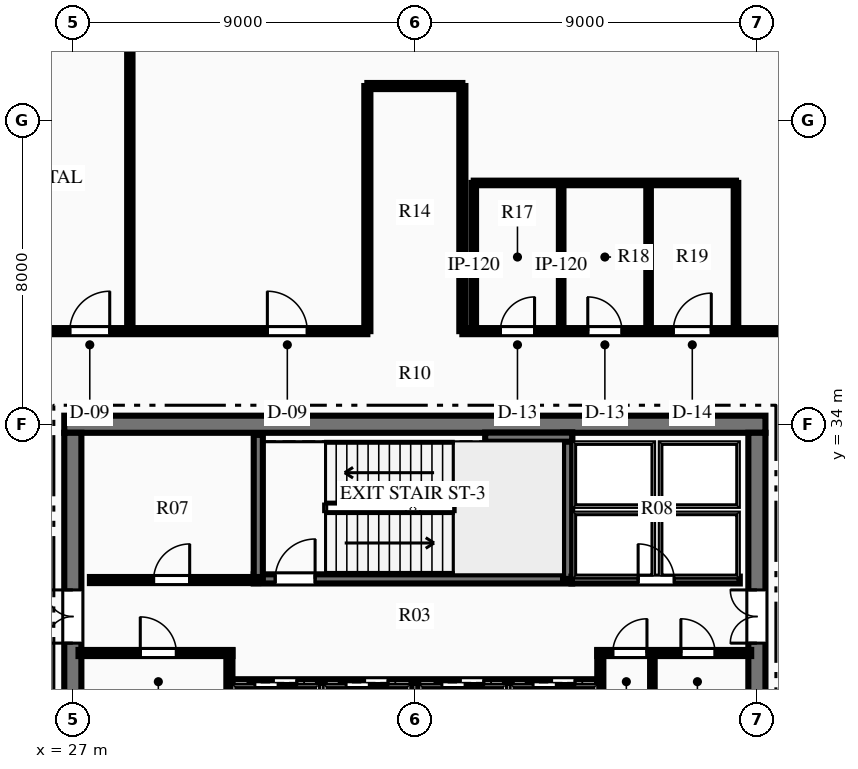
"""IFC4 building model, lengths in metres.
Left out: names, types, materials, properties, quantities, classifications, styles, units other than length and angle.
Written with IfcOpenShell. Run it as: python <this file> out.ifc"""

import sys

from ifc_helpers import new_model, si_unit, direction, frame, frame_2d, origin, place, context, subcontext, project, spatial, rectangle, extrude, element, fill, save


model = new_model("IFC4")
c1 = context("Model", 3, precision=1e-05, world=origin(), true_north=direction((0.0, 1.0)))
c2 = subcontext(c1, "Body", "Model", "MODEL_VIEW")
j1 = project(units=[si_unit("LENGTHUNIT", "METRE"), si_unit("PLANEANGLEUNIT", "RADIAN")], contexts=[c1])
p1 = place(None, origin())
s1 = spatial("IfcSite", under=j1, at=p1, CompositionType="ELEMENT")
p2 = place(p1, origin())
s2 = spatial("IfcBuilding", under=s1, at=p2, CompositionType="ELEMENT")
p3 = place(p2, frame((0.0, 0.0, 244.2)))
s3 = spatial("IfcBuildingStorey", under=s2, at=p3, CompositionType="ELEMENT", Elevation=244.2)
p4 = place(p3, frame((26.775, 34.0, 0.0), z_axis=(0.0, 0.0, 1.0), x_axis=(1.0, 0.0, 0.0)))
e1 = element("IfcWall", 1, at=p4, inside=s3, PredefinedType="SHEAR", context=c2, shape_type="SweptSolid", body=[
    extrude(rectangle(XDim=18.45, YDim=0.45, at=frame_2d((9.225, 0.0))), origin(), (0.0, 0.0, 1.0), 4.5),
])
p5 = place(p3, frame((27.0, 18.225, 0.0), z_axis=(0.0, 0.0, 1.0), x_axis=(0.0, 1.0, 0.0)))
e2 = element("IfcWall", 2, at=p5, inside=s3, PredefinedType="SHEAR", context=c2, shape_type="SweptSolid", body=[
    extrude(rectangle(XDim=15.55, YDim=0.45, at=frame_2d((7.775, 0.0))), origin(), (0.0, 0.0, 1.0), 4.5),
])
p6 = place(p5, frame((10.015, 0.0, 0.0)))
e3 = element("IfcOpeningElement", 3, at=p6, cuts=e2, PredefinedType="OPENING", context=c2, shape_type="SweptSolid", body=[
    extrude(rectangle(XDim=1.4, YDim=2.2, at=frame_2d((0.7, 1.1))), frame((0.0, 0.235, 0.0), z_axis=(0.0, -1.0, 0.0), x_axis=(1.0, 0.0, 0.0)), (0.0, 0.0, 1.0), 0.47),
])
p7 = place(p3, frame((45.0, 18.225, 0.0), z_axis=(0.0, 0.0, 1.0), x_axis=(0.0, 1.0, 0.0)))
e4 = element("IfcWall", 4, at=p7, inside=s3, PredefinedType="SHEAR", context=c2, shape_type="SweptSolid", body=[
    extrude(rectangle(XDim=15.55, YDim=0.45, at=frame_2d((7.775, 0.0))), origin(), (0.0, 0.0, 1.0), 4.5),
])
p8 = place(p7, frame((10.015, 0.0, 0.0)))
e5 = element("IfcOpeningElement", 5, at=p8, cuts=e4, PredefinedType="OPENING", context=c2, shape_type="SweptSolid", body=[
    extrude(rectangle(XDim=1.4, YDim=2.2, at=frame_2d((0.7, 1.1))), frame((0.0, 0.235, 0.0), z_axis=(0.0, -1.0, 0.0), x_axis=(1.0, 0.0, 0.0)), (0.0, 0.0, 1.0), 0.47),
])
p9 = place(p3, frame((31.76, 29.93, 0.0), z_axis=(0.0, 0.0, 1.0), x_axis=(1.0, 0.0, 0.0)))
e6 = element("IfcWall", 6, at=p9, inside=s3, PredefinedType="SHEAR", context=c2, shape_type="SweptSolid", body=[
    extrude(rectangle(XDim=8.38, YDim=0.24, at=frame_2d((4.19, 0.0))), origin(), (0.0, 0.0, 1.0), 4.5),
])
p10 = place(p9, frame((0.565, 0.0, 0.0)))
e7 = element("IfcOpeningElement", 7, at=p10, cuts=e6, PredefinedType="OPENING", context=c2, shape_type="SweptSolid", body=[
    extrude(rectangle(XDim=1.05, YDim=2.15, at=frame_2d((0.525, 1.075))), frame((0.0, 0.13, 0.0), z_axis=(0.0, -1.0, 0.0), x_axis=(1.0, 0.0, 0.0)), (0.0, 0.0, 1.0), 0.26),
])
p11 = place(p3, frame((31.88, 29.93, 0.0), z_axis=(0.0, 0.0, 1.0), x_axis=(0.0, 1.0, 0.0)))
e8 = element("IfcWall", 8, at=p11, inside=s3, PredefinedType="SHEAR", context=c2, shape_type="SweptSolid", body=[
    extrude(rectangle(XDim=3.79, YDim=0.24, at=frame_2d((1.895, 0.0))), origin(), (0.0, 0.0, 1.0), 4.5),
])
p12 = place(p3, frame((40.02, 29.93, 0.0), z_axis=(0.0, 0.0, 1.0), x_axis=(0.0, 1.0, 0.0)))
e9 = element("IfcWall", 9, at=p12, inside=s3, PredefinedType="SHEAR", context=c2, shape_type="SweptSolid", body=[
    extrude(rectangle(XDim=3.85, YDim=0.24, at=frame_2d((1.925, 0.0))), origin(), (0.0, 0.0, 1.0), 4.5),
])
p13 = place(p3, frame((37.85, 33.66, 0.0), z_axis=(0.0, 0.0, 1.0), x_axis=(1.0, 0.0, 0.0)))
e10 = element("IfcWall", 10, at=p13, inside=s3, PredefinedType="SHEAR", context=c2, shape_type="SweptSolid", body=[
    extrude(rectangle(XDim=2.29, YDim=0.24, at=frame_2d((1.145, 0.0))), origin(), (0.0, 0.0, 1.0), 4.5),
])
p14 = place(p3, frame((27.15, 27.98, 0.0), z_axis=(0.0, 0.0, 1.0), x_axis=(1.0, 0.0, 0.0)))
e11 = element("IfcWall", 11, at=p14, inside=s3, PredefinedType="PARTITIONING", context=c2, shape_type="SweptSolid", body=[
    extrude(rectangle(XDim=4.05, YDim=0.16, at=frame_2d((2.025, 0.0))), origin(), (0.0, 0.0, 1.0), 4.23),
])
p15 = place(p14, frame((1.625, 0.0, 0.0)))
e12 = element("IfcOpeningElement", 12, at=p15, cuts=e11, PredefinedType="OPENING", context=c2, shape_type="SweptSolid", body=[
    extrude(rectangle(XDim=0.95, YDim=2.15, at=frame_2d((0.475, 1.075))), frame((0.0, 0.09, 0.0), z_axis=(0.0, -1.0, 0.0), x_axis=(1.0, 0.0, 0.0)), (0.0, 0.0, 1.0), 0.18),
])
p16 = place(p3, frame((31.12, 26.54, 0.0), z_axis=(0.0, 0.0, 1.0), x_axis=(0.0, 1.0, 0.0)))
e13 = element("IfcWall", 13, at=p16, inside=s3, PredefinedType="PARTITIONING", context=c2, shape_type="SweptSolid", body=[
    extrude(rectangle(XDim=1.51, YDim=0.16, at=frame_2d((0.755, 0.0))), origin(), (0.0, 0.0, 1.0), 4.23),
])
p17 = place(p3, frame((40.8, 27.98, 0.0), z_axis=(0.0, 0.0, 1.0), x_axis=(1.0, 0.0, 0.0)))
e14 = element("IfcWall", 14, at=p17, inside=s3, PredefinedType="PARTITIONING", context=c2, shape_type="SweptSolid", body=[
    extrude(rectangle(XDim=4.05, YDim=0.16, at=frame_2d((2.025, 0.0))), origin(), (0.0, 0.0, 1.0), 4.23),
])
p18 = place(p17, frame((0.407, 0.0, 0.0)))
e15 = element("IfcOpeningElement", 15, at=p18, cuts=e14, PredefinedType="OPENING", context=c2, shape_type="SweptSolid", body=[
    extrude(rectangle(XDim=0.9, YDim=2.15, at=frame_2d((0.45, 1.075))), frame((0.0, 0.09, 0.0), z_axis=(0.0, -1.0, 0.0), x_axis=(1.0, 0.0, 0.0)), (0.0, 0.0, 1.0), 0.18),
])
p19 = place(p17, frame((2.2, 0.0, 0.0)))
e16 = element("IfcOpeningElement", 16, at=p19, cuts=e14, PredefinedType="OPENING", context=c2, shape_type="SweptSolid", body=[
    extrude(rectangle(XDim=0.9, YDim=2.15, at=frame_2d((0.45, 1.075))), frame((0.0, 0.09, 0.0), z_axis=(0.0, -1.0, 0.0), x_axis=(1.0, 0.0, 0.0)), (0.0, 0.0, 1.0), 0.18),
])
p20 = place(p3, frame((40.88, 26.54, 0.0), z_axis=(0.0, 0.0, 1.0), x_axis=(0.0, 1.0, 0.0)))
e17 = element("IfcWall", 17, at=p20, inside=s3, PredefinedType="PARTITIONING", context=c2, shape_type="SweptSolid", body=[
    extrude(rectangle(XDim=1.51, YDim=0.16, at=frame_2d((0.755, 0.0))), origin(), (0.0, 0.0, 1.0), 4.23),
])
p21 = place(p3, frame((42.25, 26.54, 0.0), z_axis=(0.0, 0.0, 1.0), x_axis=(0.0, 1.0, 0.0)))
e18 = element("IfcWall", 18, at=p21, inside=s3, PredefinedType="PARTITIONING", context=c2, shape_type="SweptSolid", body=[
    extrude(rectangle(XDim=1.44, YDim=0.12, at=frame_2d((0.72, 0.0))), origin(), (0.0, 0.0, 1.0), 4.23),
])
p22 = place(p3, frame((27.45, 29.9, 0.0), z_axis=(0.0, 0.0, 1.0), x_axis=(1.0, 0.0, 0.0)))
e19 = element("IfcWall", 19, at=p22, inside=s3, PredefinedType="PARTITIONING", context=c2, shape_type="SweptSolid", body=[
    extrude(rectangle(XDim=4.43, YDim=0.16, at=frame_2d((2.215, 0.0))), origin(), (0.0, 0.0, 1.0), 4.23),
])
p23 = place(p22, frame((1.675, 0.0, 0.0)))
e20 = element("IfcOpeningElement", 20, at=p23, cuts=e19, PredefinedType="OPENING", context=c2, shape_type="SweptSolid", body=[
    extrude(rectangle(XDim=0.95, YDim=2.15, at=frame_2d((0.475, 1.075))), frame((0.0, 0.09, 0.0), z_axis=(0.0, -1.0, 0.0), x_axis=(1.0, 0.0, 0.0)), (0.0, 0.0, 1.0), 0.18),
])
p24 = place(p3, frame((40.12, 29.9, 0.0), z_axis=(0.0, 0.0, 1.0), x_axis=(1.0, 0.0, 0.0)))
e21 = element("IfcWall", 21, at=p24, inside=s3, PredefinedType="PARTITIONING", context=c2, shape_type="SweptSolid", body=[
    extrude(rectangle(XDim=4.43, YDim=0.18, at=frame_2d((2.215, 0.0))), origin(), (0.0, 0.0, 1.0), 4.23),
])
p25 = place(p24, frame((1.755, 0.0, 0.0)))
e22 = element("IfcOpeningElement", 22, at=p25, cuts=e21, PredefinedType="OPENING", context=c2, shape_type="SweptSolid", body=[
    extrude(rectangle(XDim=0.95, YDim=2.15, at=frame_2d((0.475, 1.075))), frame((0.0, 0.1, 0.0), z_axis=(0.0, -1.0, 0.0), x_axis=(1.0, 0.0, 0.0)), (0.0, 0.0, 1.0), 0.2),
])
p26 = place(p3, frame((31.2, 27.2, 0.0), z_axis=(0.0, 0.0, 1.0), x_axis=(1.0, 0.0, 0.0)))
e23 = element("IfcWall", 23, at=p26, inside=s3, PredefinedType="PARTITIONING", context=c2, shape_type="SweptSolid", body=[
    extrude(rectangle(XDim=9.6, YDim=0.18, at=frame_2d((4.8, 0.0))), origin(), (0.0, 0.0, 1.0), 4.23),
])
p27 = place(p26, frame((0.59, 0.0, 0.0)))
e24 = element("IfcOpeningElement", 24, at=p27, cuts=e23, PredefinedType="OPENING", context=c2, shape_type="SweptSolid", body=[
    extrude(rectangle(XDim=1.1, YDim=2.15, at=frame_2d((0.55, 1.075))), frame((0.0, 0.1, 0.0), z_axis=(0.0, -1.0, 0.0), x_axis=(1.0, 0.0, 0.0)), (0.0, 0.0, 1.0), 0.2),
])
p28 = place(p26, frame((2.99, 0.0, 0.0)))
e25 = element("IfcOpeningElement", 25, at=p28, cuts=e23, PredefinedType="OPENING", context=c2, shape_type="SweptSolid", body=[
    extrude(rectangle(XDim=1.1, YDim=2.15, at=frame_2d((0.55, 1.075))), frame((0.0, 0.1, 0.0), z_axis=(0.0, -1.0, 0.0), x_axis=(1.0, 0.0, 0.0)), (0.0, 0.0, 1.0), 0.2),
])
p29 = place(p26, frame((5.51, 0.0, 0.0)))
e26 = element("IfcOpeningElement", 26, at=p29, cuts=e23, PredefinedType="OPENING", context=c2, shape_type="SweptSolid", body=[
    extrude(rectangle(XDim=1.1, YDim=2.15, at=frame_2d((0.55, 1.075))), frame((0.0, 0.1, 0.0), z_axis=(0.0, -1.0, 0.0), x_axis=(1.0, 0.0, 0.0)), (0.0, 0.0, 1.0), 0.2),
])
p30 = place(p26, frame((7.91, 0.0, 0.0)))
e27 = element("IfcOpeningElement", 27, at=p30, cuts=e23, PredefinedType="OPENING", context=c2, shape_type="SweptSolid", body=[
    extrude(rectangle(XDim=1.1, YDim=2.15, at=frame_2d((0.55, 1.075))), frame((0.0, 0.1, 0.0), z_axis=(0.0, -1.0, 0.0), x_axis=(1.0, 0.0, 0.0)), (0.0, 0.0, 1.0), 0.2),
])
for number, where, z_axis, x_axis in (
    (28, (33.54, 25.3, 0.0), (0.0, 0.0, 1.0), (0.0, 1.0, 0.0)),
    (29, (36.0, 25.3, 0.0), (0.0, 0.0, 1.0), (0.0, 1.0, 0.0)),
    (30, (38.46, 25.3, 0.0), (0.0, 0.0, 1.0), (0.0, 1.0, 0.0)),
):
    element("IfcWall", number, at=place(p3, frame(where, z_axis=z_axis, x_axis=x_axis)), inside=s3, PredefinedType="PARTITIONING", context=c2, shape_type="SweptSolid", body=[
        extrude(rectangle(XDim=1.9, YDim=0.18, at=frame_2d((0.95, 0.0))), origin(), (0.0, 0.0, 1.0), 4.23),
    ])
p31 = place(p3, frame((24.5, 36.45, 0.0), z_axis=(0.0, 0.0, 1.0), x_axis=(1.0, 0.0, 0.0)))
e31 = element("IfcWall", 31, at=p31, inside=s3, PredefinedType="PARTITIONING", context=c2, shape_type="SweptSolid", body=[
    extrude(rectangle(XDim=10.25, YDim=0.16, at=frame_2d((5.125, 0.0))), origin(), (0.0, 0.0, 1.0), 4.23),
])
p32 = place(p31, frame((2.421, 0.0, 0.0)))
e32 = element("IfcOpeningElement", 32, at=p32, cuts=e31, PredefinedType="OPENING", context=c2, shape_type="SweptSolid", body=[
    extrude(rectangle(XDim=1.05, YDim=2.15, at=frame_2d((0.525, 1.075))), frame((0.0, 0.09, 0.0), z_axis=(0.0, -1.0, 0.0), x_axis=(1.0, 0.0, 0.0)), (0.0, 0.0, 1.0), 0.18),
])
p33 = place(p31, frame((7.619, 0.0, 0.0)))
e33 = element("IfcOpeningElement", 33, at=p33, cuts=e31, PredefinedType="OPENING", context=c2, shape_type="SweptSolid", body=[
    extrude(rectangle(XDim=1.05, YDim=2.15, at=frame_2d((0.525, 1.075))), frame((0.0, 0.09, 0.0), z_axis=(0.0, -1.0, 0.0), x_axis=(1.0, 0.0, 0.0)), (0.0, 0.0, 1.0), 0.18),
])
p34 = place(p3, frame((37.25, 36.45, 0.0), z_axis=(0.0, 0.0, 1.0), x_axis=(1.0, 0.0, 0.0)))
e34 = element("IfcWall", 34, at=p34, inside=s3, PredefinedType="PARTITIONING", context=c2, shape_type="SweptSolid", body=[
    extrude(rectangle(XDim=10.25, YDim=0.16, at=frame_2d((5.125, 0.0))), origin(), (0.0, 0.0, 1.0), 4.23),
])
p35 = place(p34, frame((1.0, 0.0, 0.0)))
e35 = element("IfcOpeningElement", 35, at=p35, cuts=e34, PredefinedType="OPENING", context=c2, shape_type="SweptSolid", body=[
    extrude(rectangle(XDim=0.9, YDim=2.15, at=frame_2d((0.45, 1.075))), frame((0.0, 0.09, 0.0), z_axis=(0.0, -1.0, 0.0), x_axis=(1.0, 0.0, 0.0)), (0.0, 0.0, 1.0), 0.18),
])
p36 = place(p34, frame((3.3, 0.0, 0.0)))
e36 = element("IfcOpeningElement", 36, at=p36, cuts=e34, PredefinedType="OPENING", context=c2, shape_type="SweptSolid", body=[
    extrude(rectangle(XDim=0.9, YDim=2.15, at=frame_2d((0.45, 1.075))), frame((0.0, 0.09, 0.0), z_axis=(0.0, -1.0, 0.0), x_axis=(1.0, 0.0, 0.0)), (0.0, 0.0, 1.0), 0.18),
])
p37 = place(p34, frame((5.55, 0.0, 0.0)))
e37 = element("IfcOpeningElement", 37, at=p37, cuts=e34, PredefinedType="OPENING", context=c2, shape_type="SweptSolid", body=[
    extrude(rectangle(XDim=1.0, YDim=2.15, at=frame_2d((0.5, 1.075))), frame((0.0, 0.09, 0.0), z_axis=(0.0, -1.0, 0.0), x_axis=(1.0, 0.0, 0.0)), (0.0, 0.0, 1.0), 0.18),
])
for number, where, z_axis, x_axis in (
    (38, (34.75, 36.45, 0.0), (0.0, 0.0, 1.0), (0.0, 1.0, 0.0)),
    (39, (37.25, 36.45, 0.0), (0.0, 0.0, 1.0), (0.0, 1.0, 0.0)),
):
    element("IfcWall", number, at=place(p3, frame(where, z_axis=z_axis, x_axis=x_axis)), inside=s3, PredefinedType="PARTITIONING", context=c2, shape_type="SweptSolid", body=[
        extrude(rectangle(XDim=6.45, YDim=0.16, at=frame_2d((3.225, 0.0))), origin(), (0.0, 0.0, 1.0), 4.23),
    ])
p38 = place(p3, frame((34.75, 42.9, 0.0), z_axis=(0.0, 0.0, 1.0), x_axis=(1.0, 0.0, 0.0)))
e40 = element("IfcWall", 40, at=p38, inside=s3, PredefinedType="PARTITIONING", context=c2, shape_type="SweptSolid", body=[
    extrude(rectangle(XDim=2.5, YDim=0.16, at=frame_2d((1.25, 0.0))), origin(), (0.0, 0.0, 1.0), 4.23),
])
for number, where, z_axis, x_axis in (
    (41, (37.55, 36.45, 0.0), (0.0, 0.0, 1.0), (0.0, 1.0, 0.0)),
    (42, (39.85, 36.45, 0.0), (0.0, 0.0, 1.0), (0.0, 1.0, 0.0)),
    (43, (42.15, 36.45, 0.0), (0.0, 0.0, 1.0), (0.0, 1.0, 0.0)),
    (44, (44.45, 36.45, 0.0), (0.0, 0.0, 1.0), (0.0, 1.0, 0.0)),
):
    element("IfcWall", number, at=place(p3, frame(where, z_axis=z_axis, x_axis=x_axis)), inside=s3, PredefinedType="PARTITIONING", context=c2, shape_type="SweptSolid", body=[
        extrude(rectangle(XDim=3.9, YDim=0.12, at=frame_2d((1.95, 0.0))), origin(), (0.0, 0.0, 1.0), 4.23),
    ])
p39 = place(p3, frame((37.55, 40.35, 0.0), z_axis=(0.0, 0.0, 1.0), x_axis=(1.0, 0.0, 0.0)))
e45 = element("IfcWall", 45, at=p39, inside=s3, PredefinedType="PARTITIONING", context=c2, shape_type="SweptSolid", body=[
    extrude(rectangle(XDim=6.9, YDim=0.12, at=frame_2d((3.45, 0.0))), origin(), (0.0, 0.0, 1.0), 4.23),
])
p40 = place(p3, frame((28.5, 36.45, 0.0), z_axis=(0.0, 0.0, 1.0), x_axis=(0.0, 1.0, 0.0)))
e46 = element("IfcWall", 46, at=p40, inside=s3, PredefinedType="PARTITIONING", context=c2, shape_type="SweptSolid", body=[
    extrude(rectangle(XDim=14.999, YDim=0.14, at=frame_2d((7.5, 0.0))), origin(), (0.0, 0.0, 1.0), 4.23),
])
p41 = place(p15, origin())
e47 = element("IfcDoor", 47, at=p41, inside=s3, OperationType="SINGLE_SWING_LEFT", PredefinedType="DOOR", context=c2, shape_type="SweptSolid", body=[
    extrude(rectangle(XDim=0.95, YDim=2.15, at=frame_2d((0.475, 1.075))), frame((0.0, 0.025, 0.0), z_axis=(0.0, -1.0, 0.0), x_axis=(1.0, 0.0, 0.0)), (0.0, 0.0, 1.0), 0.05),
])
fill(e12, e47)
p42 = place(p18, origin())
e48 = element("IfcDoor", 48, at=p42, inside=s3, OperationType="SINGLE_SWING_RIGHT", PredefinedType="DOOR", context=c2, shape_type="SweptSolid", body=[
    extrude(rectangle(XDim=0.9, YDim=2.15, at=frame_2d((0.45, 1.075))), frame((0.0, 0.025, 0.0), z_axis=(0.0, -1.0, 0.0), x_axis=(1.0, 0.0, 0.0)), (0.0, 0.0, 1.0), 0.05),
])
fill(e15, e48)
p43 = place(p19, origin())
e49 = element("IfcDoor", 49, at=p43, inside=s3, OperationType="SINGLE_SWING_LEFT", PredefinedType="DOOR", context=c2, shape_type="SweptSolid", body=[
    extrude(rectangle(XDim=0.9, YDim=2.15, at=frame_2d((0.45, 1.075))), frame((0.0, 0.025, 0.0), z_axis=(0.0, -1.0, 0.0), x_axis=(1.0, 0.0, 0.0)), (0.0, 0.0, 1.0), 0.05),
])
fill(e16, e49)
p44 = place(p23, origin())
e50 = element("IfcDoor", 50, at=p44, inside=s3, OperationType="SINGLE_SWING_RIGHT", PredefinedType="DOOR", context=c2, shape_type="SweptSolid", body=[
    extrude(rectangle(XDim=0.95, YDim=2.15, at=frame_2d((0.475, 1.075))), frame((0.0, 0.025, 0.0), z_axis=(0.0, -1.0, 0.0), x_axis=(1.0, 0.0, 0.0)), (0.0, 0.0, 1.0), 0.05),
])
fill(e20, e50)
p45 = place(p25, origin())
e51 = element("IfcDoor", 51, at=p45, inside=s3, OperationType="SINGLE_SWING_LEFT", PredefinedType="DOOR", context=c2, shape_type="SweptSolid", body=[
    extrude(rectangle(XDim=0.95, YDim=2.15, at=frame_2d((0.475, 1.075))), frame((0.0, 0.025, 0.0), z_axis=(0.0, -1.0, 0.0), x_axis=(1.0, 0.0, 0.0)), (0.0, 0.0, 1.0), 0.05),
])
fill(e22, e51)
p46 = place(p10, origin())
e52 = element("IfcDoor", 52, at=p46, inside=s3, OperationType="SINGLE_SWING_RIGHT", PredefinedType="DOOR", context=c2, shape_type="SweptSolid", body=[
    extrude(rectangle(XDim=1.05, YDim=2.15, at=frame_2d((0.525, 1.075))), frame((0.0, 0.025, 0.0), z_axis=(0.0, -1.0, 0.0), x_axis=(1.0, 0.0, 0.0)), (0.0, 0.0, 1.0), 0.05),
])
fill(e7, e52)
p47 = place(p6, origin())
e53 = element("IfcDoor", 53, at=p47, inside=s3, OperationType="DOUBLE_DOOR_SINGLE_SWING", PredefinedType="DOOR", context=c2, shape_type="SweptSolid", body=[
    extrude(rectangle(XDim=1.4, YDim=2.2, at=frame_2d((0.7, 1.1))), frame((0.0, 0.025, 0.0), z_axis=(0.0, -1.0, 0.0), x_axis=(1.0, 0.0, 0.0)), (0.0, 0.0, 1.0), 0.05),
])
fill(e3, e53)
p48 = place(p8, origin())
e54 = element("IfcDoor", 54, at=p48, inside=s3, OperationType="DOUBLE_DOOR_SINGLE_SWING", PredefinedType="DOOR", context=c2, shape_type="SweptSolid", body=[
    extrude(rectangle(XDim=1.4, YDim=2.2, at=frame_2d((0.7, 1.1))), frame((0.0, 0.025, 0.0), z_axis=(0.0, -1.0, 0.0), x_axis=(1.0, 0.0, 0.0)), (0.0, 0.0, 1.0), 0.05),
])
fill(e5, e54)
p49 = place(p35, origin())
e55 = element("IfcDoor", 55, at=p49, inside=s3, OperationType="SINGLE_SWING_RIGHT", PredefinedType="DOOR", context=c2, shape_type="SweptSolid", body=[
    extrude(rectangle(XDim=0.9, YDim=2.15, at=frame_2d((0.45, 1.075))), frame((0.0, 0.025, 0.0), z_axis=(0.0, -1.0, 0.0), x_axis=(1.0, 0.0, 0.0)), (0.0, 0.0, 1.0), 0.05),
])
fill(e35, e55)
p50 = place(p36, origin())
e56 = element("IfcDoor", 56, at=p50, inside=s3, OperationType="SINGLE_SWING_LEFT", PredefinedType="DOOR", context=c2, shape_type="SweptSolid", body=[
    extrude(rectangle(XDim=0.9, YDim=2.15, at=frame_2d((0.45, 1.075))), frame((0.0, 0.025, 0.0), z_axis=(0.0, -1.0, 0.0), x_axis=(1.0, 0.0, 0.0)), (0.0, 0.0, 1.0), 0.05),
])
fill(e36, e56)
p51 = place(p37, origin())
e57 = element("IfcDoor", 57, at=p51, inside=s3, OperationType="SINGLE_SWING_RIGHT", PredefinedType="DOOR", context=c2, shape_type="SweptSolid", body=[
    extrude(rectangle(XDim=1.0, YDim=2.15, at=frame_2d((0.5, 1.075))), frame((0.0, 0.025, 0.0), z_axis=(0.0, -1.0, 0.0), x_axis=(1.0, 0.0, 0.0)), (0.0, 0.0, 1.0), 0.05),
])
fill(e37, e57)
p52 = place(p32, origin())
e58 = element("IfcDoor", 58, at=p52, inside=s3, OperationType="SINGLE_SWING_RIGHT", PredefinedType="DOOR", context=c2, shape_type="SweptSolid", body=[
    extrude(rectangle(XDim=1.05, YDim=2.15, at=frame_2d((0.525, 1.075))), frame((0.0, 0.025, 0.0), z_axis=(0.0, -1.0, 0.0), x_axis=(1.0, 0.0, 0.0)), (0.0, 0.0, 1.0), 0.05),
])
fill(e32, e58)
p53 = place(p33, origin())
e59 = element("IfcDoor", 59, at=p53, inside=s3, OperationType="SINGLE_SWING_LEFT", PredefinedType="DOOR", context=c2, shape_type="SweptSolid", body=[
    extrude(rectangle(XDim=1.05, YDim=2.15, at=frame_2d((0.525, 1.075))), frame((0.0, 0.025, 0.0), z_axis=(0.0, -1.0, 0.0), x_axis=(1.0, 0.0, 0.0)), (0.0, 0.0, 1.0), 0.05),
])
fill(e33, e59)
p54 = place(p27, origin())
e60 = element("IfcDoor", 60, at=p54, inside=s3, OperationType="SLIDING_TO_LEFT", PredefinedType="DOOR", context=c2, shape_type="SweptSolid", body=[
    extrude(rectangle(XDim=1.1, YDim=2.15, at=frame_2d((0.55, 1.075))), frame((0.0, 0.025, 0.0), z_axis=(0.0, -1.0, 0.0), x_axis=(1.0, 0.0, 0.0)), (0.0, 0.0, 1.0), 0.05),
])
fill(e24, e60)
p55 = place(p28, origin())
e61 = element("IfcDoor", 61, at=p55, inside=s3, OperationType="SLIDING_TO_LEFT", PredefinedType="DOOR", context=c2, shape_type="SweptSolid", body=[
    extrude(rectangle(XDim=1.1, YDim=2.15, at=frame_2d((0.55, 1.075))), frame((0.0, 0.025, 0.0), z_axis=(0.0, -1.0, 0.0), x_axis=(1.0, 0.0, 0.0)), (0.0, 0.0, 1.0), 0.05),
])
fill(e25, e61)
p56 = place(p29, origin())
e62 = element("IfcDoor", 62, at=p56, inside=s3, OperationType="SLIDING_TO_LEFT", PredefinedType="DOOR", context=c2, shape_type="SweptSolid", body=[
    extrude(rectangle(XDim=1.1, YDim=2.15, at=frame_2d((0.55, 1.075))), frame((0.0, 0.025, 0.0), z_axis=(0.0, -1.0, 0.0), x_axis=(1.0, 0.0, 0.0)), (0.0, 0.0, 1.0), 0.05),
])
fill(e26, e62)
p57 = place(p30, origin())
e63 = element("IfcDoor", 63, at=p57, inside=s3, OperationType="SLIDING_TO_LEFT", PredefinedType="DOOR", context=c2, shape_type="SweptSolid", body=[
    extrude(rectangle(XDim=1.1, YDim=2.15, at=frame_2d((0.55, 1.075))), frame((0.0, 0.025, 0.0), z_axis=(0.0, -1.0, 0.0), x_axis=(1.0, 0.0, 0.0)), (0.0, 0.0, 1.0), 0.05),
])
fill(e27, e63)
save(model, sys.argv[1])
